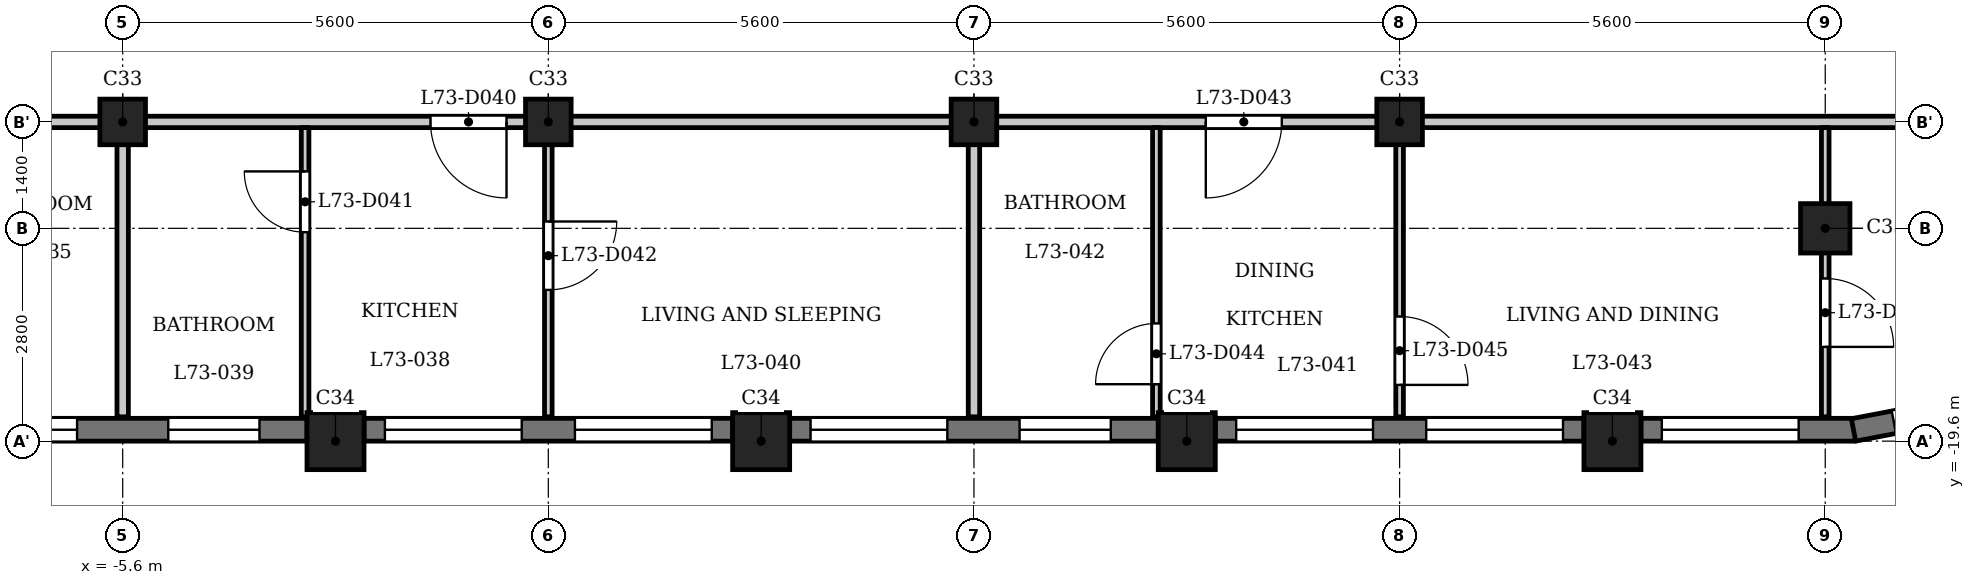
"""IFC4 building model, lengths in metres.
Left out: names, types, materials, properties, quantities, classifications, styles, units other than length and angle.
Written with IfcOpenShell. Run it as: python <this file> out.ifc"""

import sys

from ifc_helpers import new_model, si_unit, direction, frame, frame_2d, origin, origin_2d, place, context, subcontext, project, spatial, rectangle, extrude, element, fill, save


model = new_model("IFC4")
c1 = context("Model", 3, precision=1e-05, world=origin(), true_north=direction((0.0, 1.0)))
c2 = subcontext(c1, "Body", "Model", "MODEL_VIEW")
j1 = project(units=[si_unit("LENGTHUNIT", "METRE"), si_unit("PLANEANGLEUNIT", "RADIAN")], contexts=[c1])
p1 = place(None, origin())
s1 = spatial("IfcSite", under=j1, at=p1, CompositionType="ELEMENT")
p2 = place(p1, origin())
s2 = spatial("IfcBuilding", under=s1, at=p2, CompositionType="ELEMENT")
p3 = place(p2, frame((0.0, 0.0, 280.2)))
s3 = spatial("IfcBuildingStorey", under=s2, at=p3, CompositionType="ELEMENT", Elevation=280.2)
for number, where, z_axis, x_axis in (
    (1, (-2.8, -19.6, 0.0), (0.0, 0.0, 1.0), (1.0, 0.0, 0.0)),
    (2, (2.8, -19.6, 0.0), (0.0, 0.0, 1.0), (1.0, 0.0, 0.0)),
    (3, (8.4, -19.6, 0.0), (0.0, 0.0, 1.0), (1.0, 0.0, 0.0)),
    (4, (14.0, -19.6, 0.0), (0.0, 0.0, 1.0), (1.0, 0.0, 0.0)),
):
    element("IfcColumn", number, at=place(p3, frame(where, z_axis=z_axis, x_axis=x_axis)), inside=s3, PredefinedType="COLUMN", context=c2, shape_type="SweptSolid", body=[
        extrude(rectangle(XDim=0.75, YDim=0.75, at=origin_2d()), origin(), (0.0, 0.0, 1.0), 3.5),
    ])
p4 = place(p3, frame((16.8, -16.8, 0.0), z_axis=(0.0, 0.0, 1.0), x_axis=(1.0, 0.0, 0.0)))
e5 = element("IfcColumn", 5, at=p4, inside=s3, PredefinedType="COLUMN", context=c2, shape_type="SweptSolid", body=[
    extrude(rectangle(XDim=0.65, YDim=0.65, at=origin_2d()), origin(), (0.0, 0.0, 1.0), 3.5),
])
for number, where, z_axis, x_axis in (
    (6, (-5.6, -15.4, 0.0), (0.0, 0.0, 1.0), (1.0, 0.0, 0.0)),
    (7, (0.0, -15.4, 0.0), (0.0, 0.0, 1.0), (1.0, 0.0, 0.0)),
    (8, (5.6, -15.4, 0.0), (0.0, 0.0, 1.0), (1.0, 0.0, 0.0)),
    (9, (11.2, -15.4, 0.0), (0.0, 0.0, 1.0), (1.0, 0.0, 0.0)),
):
    element("IfcColumn", number, at=place(p3, frame(where, z_axis=z_axis, x_axis=x_axis)), inside=s3, PredefinedType="COLUMN", context=c2, shape_type="SweptSolid", body=[
        extrude(rectangle(XDim=0.6, YDim=0.6, at=origin_2d()), origin(), (0.0, 0.0, 1.0), 3.5),
    ])
p5 = place(p3, frame((-8.025, -19.45, 0.0), z_axis=(0.0, 0.0, 1.0), x_axis=(1.0, 0.0, 0.0)))
e10 = element("IfcWall", 10, at=p5, inside=s3, PredefinedType="SOLIDWALL", context=c2, shape_type="SweptSolid", body=[
    extrude(rectangle(XDim=4.85, YDim=0.3, at=frame_2d((2.425, 0.0))), origin(), (0.0, 0.0, 1.0), 2.5),
])
p6 = place(p5, frame((0.625, 0.0, 0.6)))
e11 = element("IfcOpeningElement", 11, at=p6, cuts=e10, PredefinedType="OPENING", context=c2, shape_type="SweptSolid", body=[
    extrude(rectangle(XDim=1.2, YDim=1.55, at=frame_2d((0.6, 0.775))), frame((0.0, 0.16, 0.0), z_axis=(0.0, -1.0, 0.0), x_axis=(1.0, 0.0, 0.0)), (0.0, 0.0, 1.0), 0.32),
])
p7 = place(p5, frame((3.025, 0.0, 0.6)))
e12 = element("IfcOpeningElement", 12, at=p7, cuts=e10, PredefinedType="OPENING", context=c2, shape_type="SweptSolid", body=[
    extrude(rectangle(XDim=1.2, YDim=1.55, at=frame_2d((0.6, 0.775))), frame((0.0, 0.16, 0.0), z_axis=(0.0, -1.0, 0.0), x_axis=(1.0, 0.0, 0.0)), (0.0, 0.0, 1.0), 0.32),
])
p8 = place(p3, frame((-2.425, -19.45, 0.0), z_axis=(0.0, 0.0, 1.0), x_axis=(1.0, 0.0, 0.0)))
e13 = element("IfcWall", 13, at=p8, inside=s3, PredefinedType="SOLIDWALL", context=c2, shape_type="SweptSolid", body=[
    extrude(rectangle(XDim=4.85, YDim=0.3, at=frame_2d((2.425, 0.0))), origin(), (0.0, 0.0, 1.0), 2.5),
])
p9 = place(p8, frame((0.275, 0.0, 0.9)))
e14 = element("IfcOpeningElement", 14, at=p9, cuts=e13, PredefinedType="OPENING", context=c2, shape_type="SweptSolid", body=[
    extrude(rectangle(XDim=1.8, YDim=1.25, at=frame_2d((0.9, 0.625))), frame((0.0, 0.16, 0.0), z_axis=(0.0, -1.0, 0.0), x_axis=(1.0, 0.0, 0.0)), (0.0, 0.0, 1.0), 0.32),
])
p10 = place(p8, frame((2.775, 0.0, 0.9)))
e15 = element("IfcOpeningElement", 15, at=p10, cuts=e13, PredefinedType="OPENING", context=c2, shape_type="SweptSolid", body=[
    extrude(rectangle(XDim=1.8, YDim=1.25, at=frame_2d((0.9, 0.625))), frame((0.0, 0.16, 0.0), z_axis=(0.0, -1.0, 0.0), x_axis=(1.0, 0.0, 0.0)), (0.0, 0.0, 1.0), 0.32),
])
p11 = place(p3, frame((3.175, -19.45, 0.0), z_axis=(0.0, 0.0, 1.0), x_axis=(1.0, 0.0, 0.0)))
e16 = element("IfcWall", 16, at=p11, inside=s3, PredefinedType="SOLIDWALL", context=c2, shape_type="SweptSolid", body=[
    extrude(rectangle(XDim=4.85, YDim=0.3, at=frame_2d((2.425, 0.0))), origin(), (0.0, 0.0, 1.0), 2.5),
])
p12 = place(p11, frame((0.275, 0.0, 0.9)))
e17 = element("IfcOpeningElement", 17, at=p12, cuts=e16, PredefinedType="OPENING", context=c2, shape_type="SweptSolid", body=[
    extrude(rectangle(XDim=1.8, YDim=1.25, at=frame_2d((0.9, 0.625))), frame((0.0, 0.16, 0.0), z_axis=(0.0, -1.0, 0.0), x_axis=(1.0, 0.0, 0.0)), (0.0, 0.0, 1.0), 0.32),
])
p13 = place(p11, frame((3.025, 0.0, 0.6)))
e18 = element("IfcOpeningElement", 18, at=p13, cuts=e16, PredefinedType="OPENING", context=c2, shape_type="SweptSolid", body=[
    extrude(rectangle(XDim=1.2, YDim=1.55, at=frame_2d((0.6, 0.775))), frame((0.0, 0.16, 0.0), z_axis=(0.0, -1.0, 0.0), x_axis=(1.0, 0.0, 0.0)), (0.0, 0.0, 1.0), 0.32),
])
p14 = place(p3, frame((8.775, -19.45, 0.0), z_axis=(0.0, 0.0, 1.0), x_axis=(1.0, 0.0, 0.0)))
e19 = element("IfcWall", 19, at=p14, inside=s3, PredefinedType="SOLIDWALL", context=c2, shape_type="SweptSolid", body=[
    extrude(rectangle(XDim=4.85, YDim=0.3, at=frame_2d((2.425, 0.0))), origin(), (0.0, 0.0, 1.0), 2.5),
])
p15 = place(p14, frame((0.275, 0.0, 0.9)))
e20 = element("IfcOpeningElement", 20, at=p15, cuts=e19, PredefinedType="OPENING", context=c2, shape_type="SweptSolid", body=[
    extrude(rectangle(XDim=1.8, YDim=1.25, at=frame_2d((0.9, 0.625))), frame((0.0, 0.16, 0.0), z_axis=(0.0, -1.0, 0.0), x_axis=(1.0, 0.0, 0.0)), (0.0, 0.0, 1.0), 0.32),
])
p16 = place(p14, frame((2.775, 0.0, 0.9)))
e21 = element("IfcOpeningElement", 21, at=p16, cuts=e19, PredefinedType="OPENING", context=c2, shape_type="SweptSolid", body=[
    extrude(rectangle(XDim=1.8, YDim=1.25, at=frame_2d((0.9, 0.625))), frame((0.0, 0.16, 0.0), z_axis=(0.0, -1.0, 0.0), x_axis=(1.0, 0.0, 0.0)), (0.0, 0.0, 1.0), 0.32),
])
p17 = place(p3, frame((14.375, -19.45, 0.0), z_axis=(0.0, 0.0, 1.0), x_axis=(1.0, 0.0, 0.0)))
e22 = element("IfcWall", 22, at=p17, inside=s3, PredefinedType="SOLIDWALL", context=c2, shape_type="SweptSolid", body=[
    extrude(rectangle(XDim=2.825, YDim=0.3, at=frame_2d((1.413, 0.0))), origin(), (0.0, 0.0, 1.0), 2.5),
])
p18 = place(p17, frame((0.275, 0.0, 0.9)))
e23 = element("IfcOpeningElement", 23, at=p18, cuts=e22, PredefinedType="OPENING", context=c2, shape_type="SweptSolid", body=[
    extrude(rectangle(XDim=1.8, YDim=1.25, at=frame_2d((0.9, 0.625))), frame((0.0, 0.16, 0.0), z_axis=(0.0, -1.0, 0.0), x_axis=(1.0, 0.0, 0.0)), (0.0, 0.0, 1.0), 0.32),
])
p19 = place(p3, frame((17.172, -19.453, 0.0), z_axis=(0.0, 0.0, 1.0), x_axis=(0.982284001233, 0.187398348234, 0.0)))
e24 = element("IfcWall", 24, at=p19, inside=s3, PredefinedType="SOLIDWALL", context=c2, shape_type="SweptSolid", body=[
    extrude(rectangle(XDim=1.881, YDim=0.3, at=frame_2d((0.941, 0.0))), origin(), (0.0, 0.0, 1.0), 2.5),
])
p20 = place(p19, frame((0.541, 0.0, 0.6)))
e25 = element("IfcOpeningElement", 25, at=p20, cuts=e24, PredefinedType="OPENING", context=c2, shape_type="SweptSolid", body=[
    extrude(rectangle(XDim=0.8, YDim=1.55, at=frame_2d((0.4, 0.775))), frame((0.0, 0.16, 0.0), z_axis=(0.0, -1.0, 0.0), x_axis=(1.0, 0.0, 0.0)), (0.0, 0.0, 1.0), 0.32),
])
p21 = place(p3, frame((-23.322, -15.4, 0.0), z_axis=(0.0, 0.0, 1.0), x_axis=(1.0, 0.0, 0.0)))
e26 = element("IfcWall", 26, at=p21, inside=s3, PredefinedType="PARTITIONING", context=c2, shape_type="SweptSolid", body=[
    extrude(rectangle(XDim=46.872, YDim=0.15, at=frame_2d((23.436, 0.0))), origin(), (0.0, 0.0, 1.0), 3.15),
])
p22 = place(p21, frame((13.772, 0.0, 0.0)))
e27 = element("IfcOpeningElement", 27, at=p22, cuts=e26, PredefinedType="OPENING", context=c2, shape_type="SweptSolid", body=[
    extrude(rectangle(XDim=1.0, YDim=2.1, at=frame_2d((0.5, 1.05))), frame((0.0, 0.085, 0.0), z_axis=(0.0, -1.0, 0.0), x_axis=(1.0, 0.0, 0.0)), (0.0, 0.0, 1.0), 0.17),
])
p23 = place(p21, frame((21.772, 0.0, 0.0)))
e28 = element("IfcOpeningElement", 28, at=p23, cuts=e26, PredefinedType="OPENING", context=c2, shape_type="SweptSolid", body=[
    extrude(rectangle(XDim=1.0, YDim=2.1, at=frame_2d((0.5, 1.05))), frame((0.0, 0.085, 0.0), z_axis=(0.0, -1.0, 0.0), x_axis=(1.0, 0.0, 0.0)), (0.0, 0.0, 1.0), 0.17),
])
p24 = place(p21, frame((31.972, 0.0, 0.0)))
e29 = element("IfcOpeningElement", 29, at=p24, cuts=e26, PredefinedType="OPENING", context=c2, shape_type="SweptSolid", body=[
    extrude(rectangle(XDim=1.0, YDim=2.1, at=frame_2d((0.5, 1.05))), frame((0.0, 0.085, 0.0), z_axis=(0.0, -1.0, 0.0), x_axis=(1.0, 0.0, 0.0)), (0.0, 0.0, 1.0), 0.17),
])
p25 = place(p3, frame((-5.6, -19.28, 0.0), z_axis=(0.0, 0.0, 1.0), x_axis=(0.0, 1.0, 0.0)))
e30 = element("IfcWall", 30, at=p25, inside=s3, PredefinedType="PARTITIONING", context=c2, shape_type="SweptSolid", body=[
    extrude(rectangle(XDim=3.805, YDim=0.15, at=frame_2d((1.902, 0.0))), origin(), (0.0, 0.0, 1.0), 3.15),
])
p26 = place(p3, frame((-3.2, -19.28, 0.0), z_axis=(0.0, 0.0, 1.0), x_axis=(0.0, 1.0, 0.0)))
e31 = element("IfcWall", 31, at=p26, inside=s3, PredefinedType="PARTITIONING", context=c2, shape_type="SweptSolid", body=[
    extrude(rectangle(XDim=3.805, YDim=0.1, at=frame_2d((1.902, 0.0))), origin(), (0.0, 0.0, 1.0), 3.15),
])
p27 = place(p26, frame((2.429, 0.0, 0.0)))
e32 = element("IfcOpeningElement", 32, at=p27, cuts=e31, PredefinedType="OPENING", context=c2, shape_type="SweptSolid", body=[
    extrude(rectangle(XDim=0.8, YDim=2.1, at=frame_2d((0.4, 1.05))), frame((0.0, 0.06, 0.0), z_axis=(0.0, -1.0, 0.0), x_axis=(1.0, 0.0, 0.0)), (0.0, 0.0, 1.0), 0.12),
])
p28 = place(p3, frame((0.0, -19.28, 0.0), z_axis=(0.0, 0.0, 1.0), x_axis=(0.0, 1.0, 0.0)))
e33 = element("IfcWall", 33, at=p28, inside=s3, PredefinedType="PARTITIONING", context=c2, shape_type="SweptSolid", body=[
    extrude(rectangle(XDim=3.805, YDim=0.1, at=frame_2d((1.902, 0.0))), origin(), (0.0, 0.0, 1.0), 3.15),
])
p29 = place(p28, frame((1.67, 0.0, 0.0)))
e34 = element("IfcOpeningElement", 34, at=p29, cuts=e33, PredefinedType="OPENING", context=c2, shape_type="SweptSolid", body=[
    extrude(rectangle(XDim=0.9, YDim=2.1, at=frame_2d((0.45, 1.05))), frame((0.0, 0.06, 0.0), z_axis=(0.0, -1.0, 0.0), x_axis=(1.0, 0.0, 0.0)), (0.0, 0.0, 1.0), 0.12),
])
p30 = place(p3, frame((5.6, -19.28, 0.0), z_axis=(0.0, 0.0, 1.0), x_axis=(0.0, 1.0, 0.0)))
e35 = element("IfcWall", 35, at=p30, inside=s3, PredefinedType="PARTITIONING", context=c2, shape_type="SweptSolid", body=[
    extrude(rectangle(XDim=3.805, YDim=0.15, at=frame_2d((1.902, 0.0))), origin(), (0.0, 0.0, 1.0), 3.15),
])
p31 = place(p3, frame((8.0, -19.28, 0.0), z_axis=(0.0, 0.0, 1.0), x_axis=(0.0, 1.0, 0.0)))
e36 = element("IfcWall", 36, at=p31, inside=s3, PredefinedType="PARTITIONING", context=c2, shape_type="SweptSolid", body=[
    extrude(rectangle(XDim=3.805, YDim=0.1, at=frame_2d((1.902, 0.0))), origin(), (0.0, 0.0, 1.0), 3.15),
])
p32 = place(p31, frame((0.429, 0.0, 0.0)))
e37 = element("IfcOpeningElement", 37, at=p32, cuts=e36, PredefinedType="OPENING", context=c2, shape_type="SweptSolid", body=[
    extrude(rectangle(XDim=0.8, YDim=2.1, at=frame_2d((0.4, 1.05))), frame((0.0, 0.06, 0.0), z_axis=(0.0, -1.0, 0.0), x_axis=(1.0, 0.0, 0.0)), (0.0, 0.0, 1.0), 0.12),
])
p33 = place(p3, frame((11.2, -19.28, 0.0), z_axis=(0.0, 0.0, 1.0), x_axis=(0.0, 1.0, 0.0)))
e38 = element("IfcWall", 38, at=p33, inside=s3, PredefinedType="PARTITIONING", context=c2, shape_type="SweptSolid", body=[
    extrude(rectangle(XDim=3.805, YDim=0.1, at=frame_2d((1.902, 0.0))), origin(), (0.0, 0.0, 1.0), 3.15),
])
p34 = place(p33, frame((0.42, 0.0, 0.0)))
e39 = element("IfcOpeningElement", 39, at=p34, cuts=e38, PredefinedType="OPENING", context=c2, shape_type="SweptSolid", body=[
    extrude(rectangle(XDim=0.9, YDim=2.1, at=frame_2d((0.45, 1.05))), frame((0.0, 0.06, 0.0), z_axis=(0.0, -1.0, 0.0), x_axis=(1.0, 0.0, 0.0)), (0.0, 0.0, 1.0), 0.12),
])
p35 = place(p3, frame((16.8, -19.28, 0.0), z_axis=(0.0, 0.0, 1.0), x_axis=(0.0, 1.0, 0.0)))
e40 = element("IfcWall", 40, at=p35, inside=s3, PredefinedType="PARTITIONING", context=c2, shape_type="SweptSolid", body=[
    extrude(rectangle(XDim=3.805, YDim=0.1, at=frame_2d((1.902, 0.0))), origin(), (0.0, 0.0, 1.0), 3.15),
])
p36 = place(p35, frame((0.92, 0.0, 0.0)))
e41 = element("IfcOpeningElement", 41, at=p36, cuts=e40, PredefinedType="OPENING", context=c2, shape_type="SweptSolid", body=[
    extrude(rectangle(XDim=0.9, YDim=2.1, at=frame_2d((0.45, 1.05))), frame((0.0, 0.06, 0.0), z_axis=(0.0, -1.0, 0.0), x_axis=(1.0, 0.0, 0.0)), (0.0, 0.0, 1.0), 0.12),
])
p37 = place(p23, origin())
e42 = element("IfcDoor", 42, at=p37, inside=s3, OperationType="SINGLE_SWING_RIGHT", PredefinedType="DOOR", context=c2, shape_type="SweptSolid", body=[
    extrude(rectangle(XDim=1.0, YDim=2.1, at=frame_2d((0.5, 1.05))), frame((0.0, 0.025, 0.0), z_axis=(0.0, -1.0, 0.0), x_axis=(1.0, 0.0, 0.0)), (0.0, 0.0, 1.0), 0.05),
])
fill(e28, e42)
p38 = place(p27, origin())
e43 = element("IfcDoor", 43, at=p38, inside=s3, OperationType="SINGLE_SWING_LEFT", PredefinedType="DOOR", context=c2, shape_type="SweptSolid", body=[
    extrude(rectangle(XDim=0.8, YDim=2.1, at=frame_2d((0.4, 1.05))), frame((0.0, 0.025, 0.0), z_axis=(0.0, -1.0, 0.0), x_axis=(1.0, 0.0, 0.0)), (0.0, 0.0, 1.0), 0.05),
])
fill(e32, e43)
p39 = place(p29, origin())
e44 = element("IfcDoor", 44, at=p39, inside=s3, OperationType="SINGLE_SWING_RIGHT", PredefinedType="DOOR", context=c2, shape_type="SweptSolid", body=[
    extrude(rectangle(XDim=0.9, YDim=2.1, at=frame_2d((0.45, 1.05))), frame((0.0, 0.025, 0.0), z_axis=(0.0, -1.0, 0.0), x_axis=(1.0, 0.0, 0.0)), (0.0, 0.0, 1.0), 0.05),
])
fill(e34, e44)
p40 = place(p24, origin())
e45 = element("IfcDoor", 45, at=p40, inside=s3, OperationType="SINGLE_SWING_LEFT", PredefinedType="DOOR", context=c2, shape_type="SweptSolid", body=[
    extrude(rectangle(XDim=1.0, YDim=2.1, at=frame_2d((0.5, 1.05))), frame((0.0, 0.025, 0.0), z_axis=(0.0, -1.0, 0.0), x_axis=(1.0, 0.0, 0.0)), (0.0, 0.0, 1.0), 0.05),
])
fill(e29, e45)
p41 = place(p32, origin())
e46 = element("IfcDoor", 46, at=p41, inside=s3, OperationType="SINGLE_SWING_RIGHT", PredefinedType="DOOR", context=c2, shape_type="SweptSolid", body=[
    extrude(rectangle(XDim=0.8, YDim=2.1, at=frame_2d((0.4, 1.05))), frame((0.0, 0.025, 0.0), z_axis=(0.0, -1.0, 0.0), x_axis=(1.0, 0.0, 0.0)), (0.0, 0.0, 1.0), 0.05),
])
fill(e37, e46)
p42 = place(p34, origin())
e47 = element("IfcDoor", 47, at=p42, inside=s3, OperationType="SINGLE_SWING_LEFT", PredefinedType="DOOR", context=c2, shape_type="SweptSolid", body=[
    extrude(rectangle(XDim=0.9, YDim=2.1, at=frame_2d((0.45, 1.05))), frame((0.0, 0.025, 0.0), z_axis=(0.0, -1.0, 0.0), x_axis=(1.0, 0.0, 0.0)), (0.0, 0.0, 1.0), 0.05),
])
fill(e39, e47)
p43 = place(p36, origin())
e48 = element("IfcDoor", 48, at=p43, inside=s3, OperationType="SINGLE_SWING_LEFT", PredefinedType="DOOR", context=c2, shape_type="SweptSolid", body=[
    extrude(rectangle(XDim=0.9, YDim=2.1, at=frame_2d((0.45, 1.05))), frame((0.0, 0.025, 0.0), z_axis=(0.0, -1.0, 0.0), x_axis=(1.0, 0.0, 0.0)), (0.0, 0.0, 1.0), 0.05),
])
fill(e41, e48)
p44 = place(p6, origin())
e49 = element("IfcWindow", 49, at=p44, inside=s3, PartitioningType="SINGLE_PANEL", PredefinedType="WINDOW", context=c2, shape_type="SweptSolid", body=[
    extrude(rectangle(XDim=1.2, YDim=1.55, at=frame_2d((0.6, 0.775))), frame((0.0, 0.03, 0.0), z_axis=(0.0, -1.0, 0.0), x_axis=(1.0, 0.0, 0.0)), (0.0, 0.0, 1.0), 0.06),
])
fill(e11, e49)
p45 = place(p7, origin())
e50 = element("IfcWindow", 50, at=p45, inside=s3, PartitioningType="SINGLE_PANEL", PredefinedType="WINDOW", context=c2, shape_type="SweptSolid", body=[
    extrude(rectangle(XDim=1.2, YDim=1.55, at=frame_2d((0.6, 0.775))), frame((0.0, 0.03, 0.0), z_axis=(0.0, -1.0, 0.0), x_axis=(1.0, 0.0, 0.0)), (0.0, 0.0, 1.0), 0.06),
])
fill(e12, e50)
p46 = place(p9, origin())
e51 = element("IfcWindow", 51, at=p46, inside=s3, PartitioningType="SINGLE_PANEL", PredefinedType="WINDOW", context=c2, shape_type="SweptSolid", body=[
    extrude(rectangle(XDim=1.8, YDim=1.25, at=frame_2d((0.9, 0.625))), frame((0.0, 0.03, 0.0), z_axis=(0.0, -1.0, 0.0), x_axis=(1.0, 0.0, 0.0)), (0.0, 0.0, 1.0), 0.06),
])
fill(e14, e51)
p47 = place(p10, origin())
e52 = element("IfcWindow", 52, at=p47, inside=s3, PartitioningType="SINGLE_PANEL", PredefinedType="WINDOW", context=c2, shape_type="SweptSolid", body=[
    extrude(rectangle(XDim=1.8, YDim=1.25, at=frame_2d((0.9, 0.625))), frame((0.0, 0.03, 0.0), z_axis=(0.0, -1.0, 0.0), x_axis=(1.0, 0.0, 0.0)), (0.0, 0.0, 1.0), 0.06),
])
fill(e15, e52)
p48 = place(p12, origin())
e53 = element("IfcWindow", 53, at=p48, inside=s3, PartitioningType="SINGLE_PANEL", PredefinedType="WINDOW", context=c2, shape_type="SweptSolid", body=[
    extrude(rectangle(XDim=1.8, YDim=1.25, at=frame_2d((0.9, 0.625))), frame((0.0, 0.03, 0.0), z_axis=(0.0, -1.0, 0.0), x_axis=(1.0, 0.0, 0.0)), (0.0, 0.0, 1.0), 0.06),
])
fill(e17, e53)
p49 = place(p13, origin())
e54 = element("IfcWindow", 54, at=p49, inside=s3, PartitioningType="SINGLE_PANEL", PredefinedType="WINDOW", context=c2, shape_type="SweptSolid", body=[
    extrude(rectangle(XDim=1.2, YDim=1.55, at=frame_2d((0.6, 0.775))), frame((0.0, 0.03, 0.0), z_axis=(0.0, -1.0, 0.0), x_axis=(1.0, 0.0, 0.0)), (0.0, 0.0, 1.0), 0.06),
])
fill(e18, e54)
p50 = place(p15, origin())
e55 = element("IfcWindow", 55, at=p50, inside=s3, PartitioningType="SINGLE_PANEL", PredefinedType="WINDOW", context=c2, shape_type="SweptSolid", body=[
    extrude(rectangle(XDim=1.8, YDim=1.25, at=frame_2d((0.9, 0.625))), frame((0.0, 0.03, 0.0), z_axis=(0.0, -1.0, 0.0), x_axis=(1.0, 0.0, 0.0)), (0.0, 0.0, 1.0), 0.06),
])
fill(e20, e55)
p51 = place(p16, origin())
e56 = element("IfcWindow", 56, at=p51, inside=s3, PartitioningType="SINGLE_PANEL", PredefinedType="WINDOW", context=c2, shape_type="SweptSolid", body=[
    extrude(rectangle(XDim=1.8, YDim=1.25, at=frame_2d((0.9, 0.625))), frame((0.0, 0.03, 0.0), z_axis=(0.0, -1.0, 0.0), x_axis=(1.0, 0.0, 0.0)), (0.0, 0.0, 1.0), 0.06),
])
fill(e21, e56)
p52 = place(p18, origin())
e57 = element("IfcWindow", 57, at=p52, inside=s3, PartitioningType="SINGLE_PANEL", PredefinedType="WINDOW", context=c2, shape_type="SweptSolid", body=[
    extrude(rectangle(XDim=1.8, YDim=1.25, at=frame_2d((0.9, 0.625))), frame((0.0, 0.03, 0.0), z_axis=(0.0, -1.0, 0.0), x_axis=(1.0, 0.0, 0.0)), (0.0, 0.0, 1.0), 0.06),
])
fill(e23, e57)
p53 = place(p20, origin())
e58 = element("IfcWindow", 58, at=p53, inside=s3, PartitioningType="SINGLE_PANEL", PredefinedType="WINDOW", context=c2, shape_type="SweptSolid", body=[
    extrude(rectangle(XDim=0.8, YDim=1.55, at=frame_2d((0.4, 0.775))), frame((0.0, 0.03, 0.0), z_axis=(0.0, -1.0, 0.0), x_axis=(1.0, 0.0, 0.0)), (0.0, 0.0, 1.0), 0.06),
])
fill(e25, e58)
save(model, sys.argv[1])
